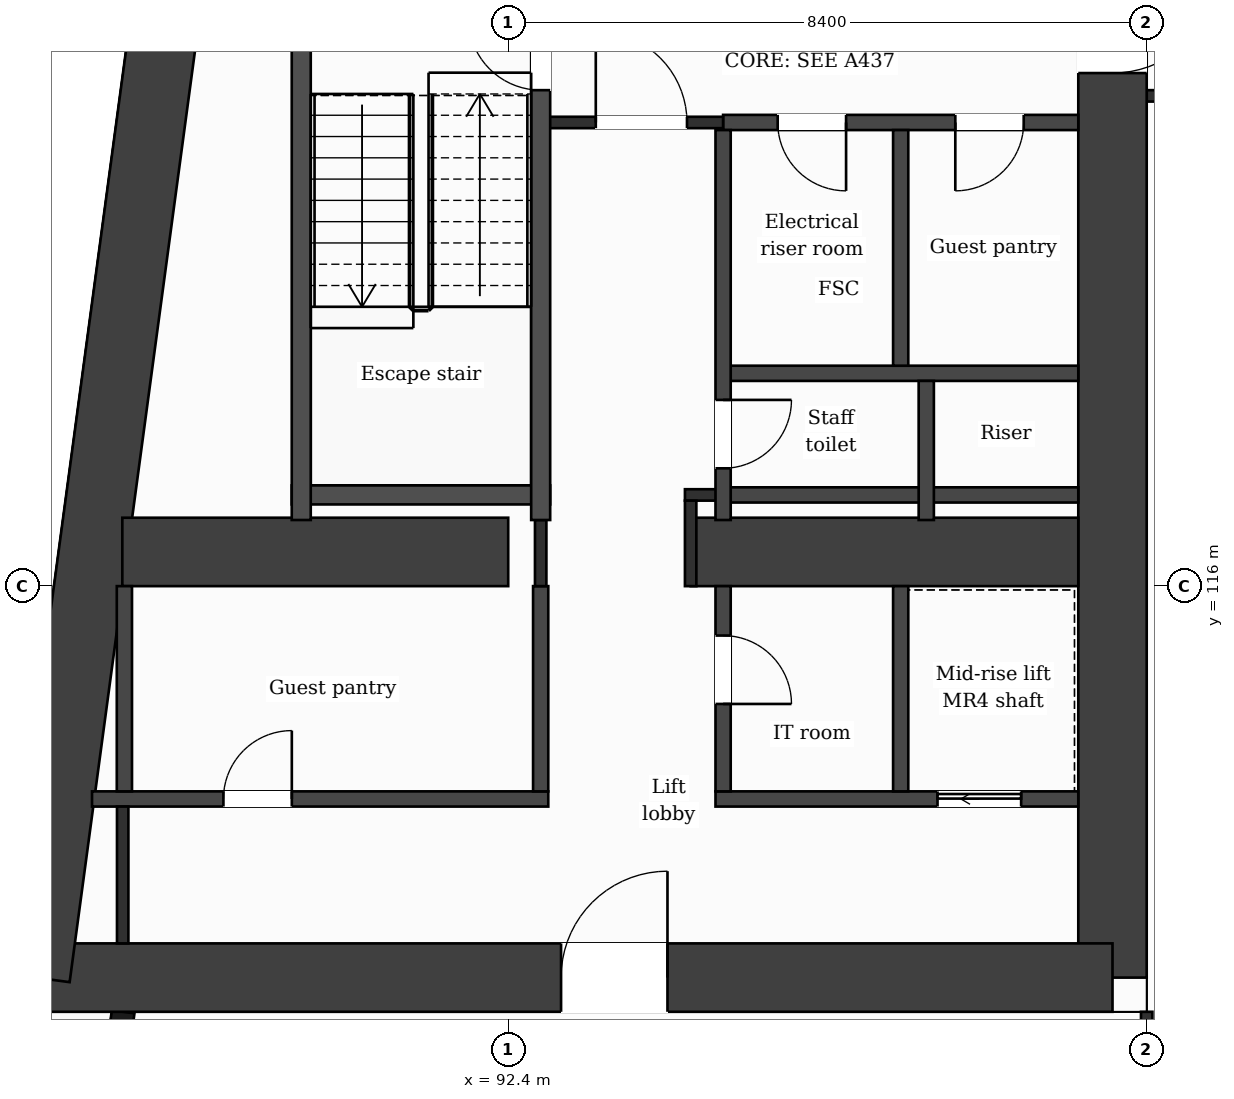
"""IFC4 building model, lengths in metres.
Left out: names, types, materials, properties, quantities, classifications, styles, units other than length and angle.
Written with IfcOpenShell. Run it as: python <this file> out.ifc"""

import sys

from ifc_helpers import new_model, si_unit, direction, frame, frame_2d, origin, place, context, subcontext, project, spatial, rectangle, extrude, element, fill, save


model = new_model("IFC4")
c1 = context("Model", 3, precision=1e-05, world=origin(), true_north=direction((0.0, 1.0)))
c2 = subcontext(c1, "Body", "Model", "MODEL_VIEW")
j1 = project(units=[si_unit("LENGTHUNIT", "METRE"), si_unit("PLANEANGLEUNIT", "RADIAN")], contexts=[c1])
p1 = place(None, origin())
s1 = spatial("IfcSite", under=j1, at=p1, CompositionType="ELEMENT")
p2 = place(p1, origin())
s2 = spatial("IfcBuilding", under=s1, at=p2, CompositionType="ELEMENT")
p3 = place(p2, frame((0.0, 0.0, 155.2)))
s3 = spatial("IfcBuildingStorey", under=s2, at=p3, CompositionType="ELEMENT", Elevation=155.2)
p4 = place(p3, frame((100.35, 131.95, 0.0), z_axis=(0.0, 0.0, 1.0), x_axis=(0.0, -1.0, 0.0)))
e1 = element("IfcWall", 1, at=p4, inside=s3, PredefinedType="SHEAR", context=c2, shape_type="SweptSolid", body=[
    extrude(rectangle(XDim=21.1, YDim=0.9, at=frame_2d((10.55, 0.0))), origin(), (0.0, 0.0, 1.0), 3.7),
])
p5 = place(p4, frame((7.8, 0.0, 0.0)))
e2 = element("IfcOpeningElement", 2, at=p5, cuts=e1, PredefinedType="OPENING", context=c2, shape_type="SweptSolid", body=[
    extrude(rectangle(XDim=1.4, YDim=2.1, at=frame_2d((0.7, 1.05))), frame((0.0, 0.46, 0.0), z_axis=(0.0, -1.0, 0.0), x_axis=(1.0, 0.0, 0.0)), (0.0, 0.0, 1.0), 0.92),
])
p6 = place(p3, frame((100.35, 110.85, 0.0), z_axis=(0.0, 0.0, 1.0), x_axis=(-1.0, 0.0, 0.0)))
e3 = element("IfcWall", 3, at=p6, inside=s3, PredefinedType="SHEAR", context=c2, shape_type="SweptSolid", body=[
    extrude(rectangle(XDim=14.166, YDim=0.9, at=frame_2d((7.083, 0.0))), origin(), (0.0, 0.0, 1.0), 3.7),
])
p7 = place(p6, frame((5.855, 0.0, 0.0)))
e4 = element("IfcOpeningElement", 4, at=p7, cuts=e3, PredefinedType="OPENING", context=c2, shape_type="SweptSolid", body=[
    extrude(rectangle(XDim=1.4, YDim=2.1, at=frame_2d((0.7, 1.05))), frame((0.0, 0.46, 0.0), z_axis=(0.0, -1.0, 0.0), x_axis=(1.0, 0.0, 0.0)), (0.0, 0.0, 1.0), 0.92),
])
p8 = place(p3, frame((86.184, 110.85, 0.0), z_axis=(0.0, 0.0, 1.0), x_axis=(0.133410495943, 0.991060865725, 0.0)))
e5 = element("IfcWall", 5, at=p8, inside=s3, PredefinedType="SHEAR", context=c2, shape_type="SweptSolid", body=[
    extrude(rectangle(XDim=21.29, YDim=0.9, at=frame_2d((10.645, 0.0))), origin(), (0.0, 0.0, 1.0), 3.7),
])
p9 = place(p3, frame((87.323, 116.45, 0.0), z_axis=(0.0, 0.0, 1.0), x_axis=(1.0, 0.0, 0.0)))
e6 = element("IfcWall", 6, at=p9, inside=s3, PredefinedType="SHEAR", context=c2, shape_type="SweptSolid", body=[
    extrude(rectangle(XDim=5.077, YDim=0.9, at=frame_2d((2.539, 0.0))), origin(), (0.0, 0.0, 1.0), 3.7),
])
p10 = place(p3, frame((94.8, 116.45, 0.0), z_axis=(0.0, 0.0, 1.0), x_axis=(1.0, 0.0, 0.0)))
e7 = element("IfcWall", 7, at=p10, inside=s3, PredefinedType="SHEAR", context=c2, shape_type="SweptSolid", body=[
    extrude(rectangle(XDim=5.1, YDim=0.9, at=frame_2d((2.55, 0.0))), origin(), (0.0, 0.0, 1.0), 3.7),
])
p11 = place(p3, frame((87.334, 110.4, 0.0), z_axis=(0.0, 0.0, 1.0), x_axis=(-0.133437175554, -0.991057273915, 0.0)))
e8 = element("IfcWall", 8, at=p11, inside=s3, PredefinedType="SOLIDWALL", context=c2, shape_type="SweptSolid", body=[
    extrude(rectangle(XDim=6.781, YDim=0.3, at=frame_2d((3.39, 0.0))), origin(), (0.0, 0.0, 1.0), 3.38),
])
p12 = place(p11, frame((1.418, 0.0, 0.0)))
e9 = element("IfcOpeningElement", 9, at=p12, cuts=e8, PredefinedType="OPENING", context=c2, shape_type="SweptSolid", body=[
    extrude(rectangle(XDim=1.2, YDim=2.4, at=frame_2d((0.6, 1.2))), frame((0.0, 0.16, 0.0), z_axis=(0.0, -1.0, 0.0), x_axis=(1.0, 0.0, 0.0)), (0.0, 0.0, 1.0), 0.32),
])
p13 = place(p11, frame((4.758, 0.0, 0.9)))
e10 = element("IfcOpeningElement", 10, at=p13, cuts=e8, PredefinedType="OPENING", context=c2, shape_type="SweptSolid", body=[
    extrude(rectangle(XDim=1.2, YDim=2.1, at=frame_2d((0.6, 1.05))), frame((0.0, 0.16, 0.0), z_axis=(0.0, -1.0, 0.0), x_axis=(1.0, 0.0, 0.0)), (0.0, 0.0, 1.0), 0.32),
])
p14 = place(p3, frame((86.924, 113.2, 0.0), z_axis=(0.0, 0.0, 1.0), x_axis=(1.0, 0.0, 0.0)))
e11 = element("IfcWall", 11, at=p14, inside=s3, PredefinedType="PARTITIONING", context=c2, shape_type="SweptSolid", body=[
    extrude(rectangle(XDim=6.003, YDim=0.2, at=frame_2d((3.001, 0.0))), origin(), (0.0, 0.0, 1.0), 3.38),
])
p15 = place(p14, frame((1.729, 0.0, 0.0)))
e12 = element("IfcOpeningElement", 12, at=p15, cuts=e11, PredefinedType="OPENING", context=c2, shape_type="SweptSolid", body=[
    extrude(rectangle(XDim=0.9, YDim=2.1, at=frame_2d((0.45, 1.05))), frame((0.0, 0.11, 0.0), z_axis=(0.0, -1.0, 0.0), x_axis=(1.0, 0.0, 0.0)), (0.0, 0.0, 1.0), 0.22),
])
p16 = place(p3, frame((95.127, 113.2, 0.0), z_axis=(0.0, 0.0, 1.0), x_axis=(1.0, 0.0, 0.0)))
e13 = element("IfcWall", 13, at=p16, inside=s3, PredefinedType="PARTITIONING", context=c2, shape_type="SweptSolid", body=[
    extrude(rectangle(XDim=4.773, YDim=0.2, at=frame_2d((2.386, 0.0))), origin(), (0.0, 0.0, 1.0), 3.38),
])
p17 = place(p16, frame((2.921, 0.0, 0.0)))
e14 = element("IfcOpeningElement", 14, at=p17, cuts=e13, PredefinedType="OPENING", context=c2, shape_type="SweptSolid", body=[
    extrude(rectangle(XDim=1.1, YDim=2.1, at=frame_2d((0.55, 1.05))), frame((0.0, 0.11, 0.0), z_axis=(0.0, -1.0, 0.0), x_axis=(1.0, 0.0, 0.0)), (0.0, 0.0, 1.0), 0.22),
])
p18 = place(p3, frame((95.227, 117.2, 0.0), z_axis=(0.0, 0.0, 1.0), x_axis=(1.0, 0.0, 0.0)))
e15 = element("IfcWall", 15, at=p18, inside=s3, PredefinedType="PARTITIONING", context=c2, shape_type="SweptSolid", body=[
    extrude(rectangle(XDim=4.673, YDim=0.2, at=frame_2d((2.336, 0.0))), origin(), (0.0, 0.0, 1.0), 3.38),
])
p19 = place(p3, frame((94.725, 117.2, 0.0), z_axis=(0.0, 0.0, 1.0), x_axis=(1.0, 0.0, 0.0)))
e16 = element("IfcWall", 16, at=p19, inside=s3, PredefinedType="PARTITIONING", context=c2, shape_type="SweptSolid", body=[
    extrude(rectangle(XDim=0.502, YDim=0.15, at=frame_2d((0.251, 0.0))), origin(), (0.0, 0.0, 1.0), 3.38),
])
p20 = place(p3, frame((89.552, 117.2, 0.0), z_axis=(0.0, 0.0, 1.0), x_axis=(1.0, 0.0, 0.0)))
e17 = element("IfcWall", 17, at=p20, inside=s3, PredefinedType="PARTITIONING", context=c2, shape_type="SweptSolid", body=[
    extrude(rectangle(XDim=3.4, YDim=0.25, at=frame_2d((1.7, 0.0))), origin(), (0.0, 0.0, 1.0), 3.38),
])
p21 = place(p3, frame((95.227, 118.8, 0.0), z_axis=(0.0, 0.0, 1.0), x_axis=(1.0, 0.0, 0.0)))
e18 = element("IfcWall", 18, at=p21, inside=s3, PredefinedType="PARTITIONING", context=c2, shape_type="SweptSolid", body=[
    extrude(rectangle(XDim=4.673, YDim=0.2, at=frame_2d((2.336, 0.0))), origin(), (0.0, 0.0, 1.0), 3.38),
])
p22 = place(p3, frame((95.227, 122.1, 0.0), z_axis=(0.0, 0.0, 1.0), x_axis=(1.0, 0.0, 0.0)))
e19 = element("IfcWall", 19, at=p22, inside=s3, PredefinedType="PARTITIONING", context=c2, shape_type="SweptSolid", body=[
    extrude(rectangle(XDim=4.673, YDim=0.2, at=frame_2d((2.336, 0.0))), origin(), (0.0, 0.0, 1.0), 3.38),
])
p23 = place(p22, frame((0.718, 0.0, 0.0)))
e20 = element("IfcOpeningElement", 20, at=p23, cuts=e19, PredefinedType="OPENING", context=c2, shape_type="SweptSolid", body=[
    extrude(rectangle(XDim=0.9, YDim=2.1, at=frame_2d((0.45, 1.05))), frame((0.0, 0.11, 0.0), z_axis=(0.0, -1.0, 0.0), x_axis=(1.0, 0.0, 0.0)), (0.0, 0.0, 1.0), 0.22),
])
p24 = place(p22, frame((3.055, 0.0, 0.0)))
e21 = element("IfcOpeningElement", 21, at=p24, cuts=e19, PredefinedType="OPENING", context=c2, shape_type="SweptSolid", body=[
    extrude(rectangle(XDim=0.9, YDim=2.1, at=frame_2d((0.45, 1.05))), frame((0.0, 0.11, 0.0), z_axis=(0.0, -1.0, 0.0), x_axis=(1.0, 0.0, 0.0)), (0.0, 0.0, 1.0), 0.22),
])
p25 = place(p3, frame((92.827, 122.1, 0.0), z_axis=(0.0, 0.0, 1.0), x_axis=(1.0, 0.0, 0.0)))
e22 = element("IfcWall", 22, at=p25, inside=s3, PredefinedType="PARTITIONING", context=c2, shape_type="SweptSolid", body=[
    extrude(rectangle(XDim=2.4, YDim=0.15, at=frame_2d((1.2, 0.0))), origin(), (0.0, 0.0, 1.0), 3.38),
])
p26 = place(p25, frame((0.725, 0.0, 0.0)))
e23 = element("IfcOpeningElement", 23, at=p26, cuts=e22, PredefinedType="OPENING", context=c2, shape_type="SweptSolid", body=[
    extrude(rectangle(XDim=1.2, YDim=2.1, at=frame_2d((0.6, 1.05))), frame((0.0, 0.085, 0.0), z_axis=(0.0, -1.0, 0.0), x_axis=(1.0, 0.0, 0.0)), (0.0, 0.0, 1.0), 0.17),
])
p27 = place(p3, frame((100.8, 122.45, 0.0), z_axis=(0.0, 0.0, 1.0), x_axis=(1.0, 0.0, 0.0)))
e24 = element("IfcWall", 24, at=p27, inside=s3, PredefinedType="PARTITIONING", context=c2, shape_type="SweptSolid", body=[
    extrude(rectangle(XDim=25.2, YDim=0.15, at=frame_2d((12.6, 0.0))), origin(), (0.0, 0.0, 1.0), 3.38),
])
p28 = place(p3, frame((87.35, 113.3, 0.0), z_axis=(0.0, 0.0, 1.0), x_axis=(0.0, 1.0, 0.0)))
e25 = element("IfcWall", 25, at=p28, inside=s3, PredefinedType="PARTITIONING", context=c2, shape_type="SweptSolid", body=[
    extrude(rectangle(XDim=2.7, YDim=0.2, at=frame_2d((1.35, 0.0))), origin(), (0.0, 0.0, 1.0), 3.38),
])
p29 = place(p3, frame((87.328, 111.3, 0.0), z_axis=(0.0, 0.0, 1.0), x_axis=(0.0, 1.0, 0.0)))
e26 = element("IfcWall", 26, at=p29, inside=s3, PredefinedType="PARTITIONING", context=c2, shape_type="SweptSolid", body=[
    extrude(rectangle(XDim=1.8, YDim=0.15, at=frame_2d((0.9, 0.0))), origin(), (0.0, 0.0, 1.0), 3.38),
])
p30 = place(p3, frame((89.677, 116.87, 0.0), z_axis=(0.0, 0.0, 1.0), x_axis=(0.0, 1.0, 0.0)))
e27 = element("IfcWall", 27, at=p30, inside=s3, PredefinedType="PARTITIONING", context=c2, shape_type="SweptSolid", body=[
    extrude(rectangle(XDim=6.955, YDim=0.25, at=frame_2d((3.478, 0.0))), origin(), (0.0, 0.0, 1.0), 3.38),
])
p31 = place(p3, frame((92.827, 113.3, 0.0), z_axis=(0.0, 0.0, 1.0), x_axis=(0.0, 1.0, 0.0)))
e28 = element("IfcWall", 28, at=p31, inside=s3, PredefinedType="PARTITIONING", context=c2, shape_type="SweptSolid", body=[
    extrude(rectangle(XDim=2.7, YDim=0.2, at=frame_2d((1.35, 0.0))), origin(), (0.0, 0.0, 1.0), 3.38),
])
p32 = place(p3, frame((92.827, 116.0, 0.0), z_axis=(0.0, 0.0, 1.0), x_axis=(0.0, 1.0, 0.0)))
e29 = element("IfcWall", 29, at=p32, inside=s3, PredefinedType="PARTITIONING", context=c2, shape_type="SweptSolid", body=[
    extrude(rectangle(XDim=0.87, YDim=0.15, at=frame_2d((0.435, 0.0))), origin(), (0.0, 0.0, 1.0), 3.38),
])
p33 = place(p3, frame((92.827, 116.87, 0.0), z_axis=(0.0, 0.0, 1.0), x_axis=(0.0, 1.0, 0.0)))
e30 = element("IfcWall", 30, at=p33, inside=s3, PredefinedType="PARTITIONING", context=c2, shape_type="SweptSolid", body=[
    extrude(rectangle(XDim=6.955, YDim=0.25, at=frame_2d((3.478, 0.0))), origin(), (0.0, 0.0, 1.0), 3.38),
])
p34 = place(p33, frame((5.655, 0.0, 0.0)))
e31 = element("IfcOpeningElement", 31, at=p34, cuts=e30, PredefinedType="OPENING", context=c2, shape_type="SweptSolid", body=[
    extrude(rectangle(XDim=0.95, YDim=2.1, at=frame_2d((0.475, 1.05))), frame((0.0, 0.135, 0.0), z_axis=(0.0, -1.0, 0.0), x_axis=(1.0, 0.0, 0.0)), (0.0, 0.0, 1.0), 0.27),
])
p35 = place(p3, frame((94.8, 116.0, 0.0), z_axis=(0.0, 0.0, 1.0), x_axis=(0.0, 1.0, 0.0)))
e32 = element("IfcWall", 32, at=p35, inside=s3, PredefinedType="PARTITIONING", context=c2, shape_type="SweptSolid", body=[
    extrude(rectangle(XDim=1.125, YDim=0.15, at=frame_2d((0.562, 0.0))), origin(), (0.0, 0.0, 1.0), 3.38),
])
p36 = place(p3, frame((95.227, 113.3, 0.0), z_axis=(0.0, 0.0, 1.0), x_axis=(0.0, 1.0, 0.0)))
e33 = element("IfcWall", 33, at=p36, inside=s3, PredefinedType="PARTITIONING", context=c2, shape_type="SweptSolid", body=[
    extrude(rectangle(XDim=2.7, YDim=0.2, at=frame_2d((1.35, 0.0))), origin(), (0.0, 0.0, 1.0), 3.38),
])
p37 = place(p36, frame((1.15, 0.0, 0.0)))
e34 = element("IfcOpeningElement", 34, at=p37, cuts=e33, PredefinedType="OPENING", context=c2, shape_type="SweptSolid", body=[
    extrude(rectangle(XDim=0.9, YDim=2.1, at=frame_2d((0.45, 1.05))), frame((0.0, 0.11, 0.0), z_axis=(0.0, -1.0, 0.0), x_axis=(1.0, 0.0, 0.0)), (0.0, 0.0, 1.0), 0.22),
])
p38 = place(p3, frame((95.227, 116.87, 0.0), z_axis=(0.0, 0.0, 1.0), x_axis=(0.0, 1.0, 0.0)))
e35 = element("IfcWall", 35, at=p38, inside=s3, PredefinedType="PARTITIONING", context=c2, shape_type="SweptSolid", body=[
    extrude(rectangle(XDim=5.13, YDim=0.2, at=frame_2d((2.565, 0.0))), origin(), (0.0, 0.0, 1.0), 3.38),
])
p39 = place(p38, frame((0.68, 0.0, 0.0)))
e36 = element("IfcOpeningElement", 36, at=p39, cuts=e35, PredefinedType="OPENING", context=c2, shape_type="SweptSolid", body=[
    extrude(rectangle(XDim=0.9, YDim=2.1, at=frame_2d((0.45, 1.05))), frame((0.0, 0.11, 0.0), z_axis=(0.0, -1.0, 0.0), x_axis=(1.0, 0.0, 0.0)), (0.0, 0.0, 1.0), 0.22),
])
p40 = place(p3, frame((97.563, 113.3, 0.0), z_axis=(0.0, 0.0, 1.0), x_axis=(0.0, 1.0, 0.0)))
e37 = element("IfcWall", 37, at=p40, inside=s3, PredefinedType="PARTITIONING", context=c2, shape_type="SweptSolid", body=[
    extrude(rectangle(XDim=2.7, YDim=0.2, at=frame_2d((1.35, 0.0))), origin(), (0.0, 0.0, 1.0), 3.38),
])
p41 = place(p3, frame((97.563, 118.9, 0.0), z_axis=(0.0, 0.0, 1.0), x_axis=(0.0, 1.0, 0.0)))
e38 = element("IfcWall", 38, at=p41, inside=s3, PredefinedType="PARTITIONING", context=c2, shape_type="SweptSolid", body=[
    extrude(rectangle(XDim=3.1, YDim=0.2, at=frame_2d((1.55, 0.0))), origin(), (0.0, 0.0, 1.0), 3.38),
])
p42 = place(p3, frame((97.9, 116.87, 0.0), z_axis=(0.0, 0.0, 1.0), x_axis=(0.0, 1.0, 0.0)))
e39 = element("IfcWall", 39, at=p42, inside=s3, PredefinedType="PARTITIONING", context=c2, shape_type="SweptSolid", body=[
    extrude(rectangle(XDim=1.83, YDim=0.2, at=frame_2d((0.915, 0.0))), origin(), (0.0, 0.0, 1.0), 3.38),
])
p43 = place(p3, frame((100.8, 109.075, 0.0), z_axis=(0.0, 0.0, 1.0), x_axis=(0.0, 1.0, 0.0)))
e40 = element("IfcWall", 40, at=p43, inside=s3, PredefinedType="PARTITIONING", context=c2, shape_type="SweptSolid", body=[
    extrude(rectangle(XDim=1.325, YDim=0.15, at=frame_2d((0.663, 0.0))), origin(), (0.0, 0.0, 1.0), 3.38),
])
p44 = place(p26, origin())
e41 = element("IfcDoor", 41, at=p44, inside=s3, OperationType="SINGLE_SWING_LEFT", PredefinedType="DOOR", context=c2, shape_type="SweptSolid", body=[
    extrude(rectangle(XDim=1.2, YDim=2.1, at=frame_2d((0.6, 1.05))), frame((0.0, 0.025, 0.0), z_axis=(0.0, -1.0, 0.0), x_axis=(1.0, 0.0, 0.0)), (0.0, 0.0, 1.0), 0.05),
])
fill(e23, e41)
p45 = place(p23, origin())
e42 = element("IfcDoor", 42, at=p45, inside=s3, OperationType="SINGLE_SWING_RIGHT", PredefinedType="DOOR", context=c2, shape_type="SweptSolid", body=[
    extrude(rectangle(XDim=0.9, YDim=2.1, at=frame_2d((0.45, 1.05))), frame((0.0, 0.025, 0.0), z_axis=(0.0, -1.0, 0.0), x_axis=(1.0, 0.0, 0.0)), (0.0, 0.0, 1.0), 0.05),
])
fill(e20, e42)
p46 = place(p24, origin())
e43 = element("IfcDoor", 43, at=p46, inside=s3, OperationType="SINGLE_SWING_LEFT", PredefinedType="DOOR", context=c2, shape_type="SweptSolid", body=[
    extrude(rectangle(XDim=0.9, YDim=2.1, at=frame_2d((0.45, 1.05))), frame((0.0, 0.025, 0.0), z_axis=(0.0, -1.0, 0.0), x_axis=(1.0, 0.0, 0.0)), (0.0, 0.0, 1.0), 0.05),
])
fill(e21, e43)
p47 = place(p34, origin())
e44 = element("IfcDoor", 44, at=p47, inside=s3, OperationType="SINGLE_SWING_RIGHT", PredefinedType="DOOR", context=c2, shape_type="SweptSolid", body=[
    extrude(rectangle(XDim=0.95, YDim=2.1, at=frame_2d((0.475, 1.05))), frame((0.0, 0.025, 0.0), z_axis=(0.0, -1.0, 0.0), x_axis=(1.0, 0.0, 0.0)), (0.0, 0.0, 1.0), 0.05),
])
fill(e31, e44)
p48 = place(p39, origin())
e45 = element("IfcDoor", 45, at=p48, inside=s3, OperationType="SINGLE_SWING_RIGHT", PredefinedType="DOOR", context=c2, shape_type="SweptSolid", body=[
    extrude(rectangle(XDim=0.9, YDim=2.1, at=frame_2d((0.45, 1.05))), frame((0.0, 0.025, 0.0), z_axis=(0.0, -1.0, 0.0), x_axis=(1.0, 0.0, 0.0)), (0.0, 0.0, 1.0), 0.05),
])
fill(e36, e45)
p49 = place(p17, origin())
e46 = element("IfcDoor", 46, at=p49, inside=s3, OperationType="SLIDING_TO_LEFT", PredefinedType="DOOR", context=c2, shape_type="SweptSolid", body=[
    extrude(rectangle(XDim=1.1, YDim=2.1, at=frame_2d((0.55, 1.05))), frame((0.0, 0.025, 0.0), z_axis=(0.0, -1.0, 0.0), x_axis=(1.0, 0.0, 0.0)), (0.0, 0.0, 1.0), 0.05),
])
fill(e14, e46)
p50 = place(p15, origin())
e47 = element("IfcDoor", 47, at=p50, inside=s3, OperationType="SINGLE_SWING_RIGHT", PredefinedType="DOOR", context=c2, shape_type="SweptSolid", body=[
    extrude(rectangle(XDim=0.9, YDim=2.1, at=frame_2d((0.45, 1.05))), frame((0.0, 0.025, 0.0), z_axis=(0.0, -1.0, 0.0), x_axis=(1.0, 0.0, 0.0)), (0.0, 0.0, 1.0), 0.05),
])
fill(e12, e47)
p51 = place(p37, origin())
e48 = element("IfcDoor", 48, at=p51, inside=s3, OperationType="SINGLE_SWING_LEFT", PredefinedType="DOOR", context=c2, shape_type="SweptSolid", body=[
    extrude(rectangle(XDim=0.9, YDim=2.1, at=frame_2d((0.45, 1.05))), frame((0.0, 0.025, 0.0), z_axis=(0.0, -1.0, 0.0), x_axis=(1.0, 0.0, 0.0)), (0.0, 0.0, 1.0), 0.05),
])
fill(e34, e48)
p52 = place(p7, origin())
e49 = element("IfcDoor", 49, at=p52, inside=s3, OperationType="SINGLE_SWING_LEFT", PredefinedType="DOOR", context=c2, shape_type="SweptSolid", body=[
    extrude(rectangle(XDim=1.4, YDim=2.1, at=frame_2d((0.7, 1.05))), frame((0.0, 0.025, 0.0), z_axis=(0.0, -1.0, 0.0), x_axis=(1.0, 0.0, 0.0)), (0.0, 0.0, 1.0), 0.05),
])
fill(e4, e49)
p53 = place(p5, origin())
e50 = element("IfcDoor", 50, at=p53, inside=s3, OperationType="SINGLE_SWING_LEFT", PredefinedType="DOOR", context=c2, shape_type="SweptSolid", body=[
    extrude(rectangle(XDim=1.4, YDim=2.1, at=frame_2d((0.7, 1.05))), frame((0.0, 0.025, 0.0), z_axis=(0.0, -1.0, 0.0), x_axis=(1.0, 0.0, 0.0)), (0.0, 0.0, 1.0), 0.05),
])
fill(e2, e50)
save(model, sys.argv[1])
